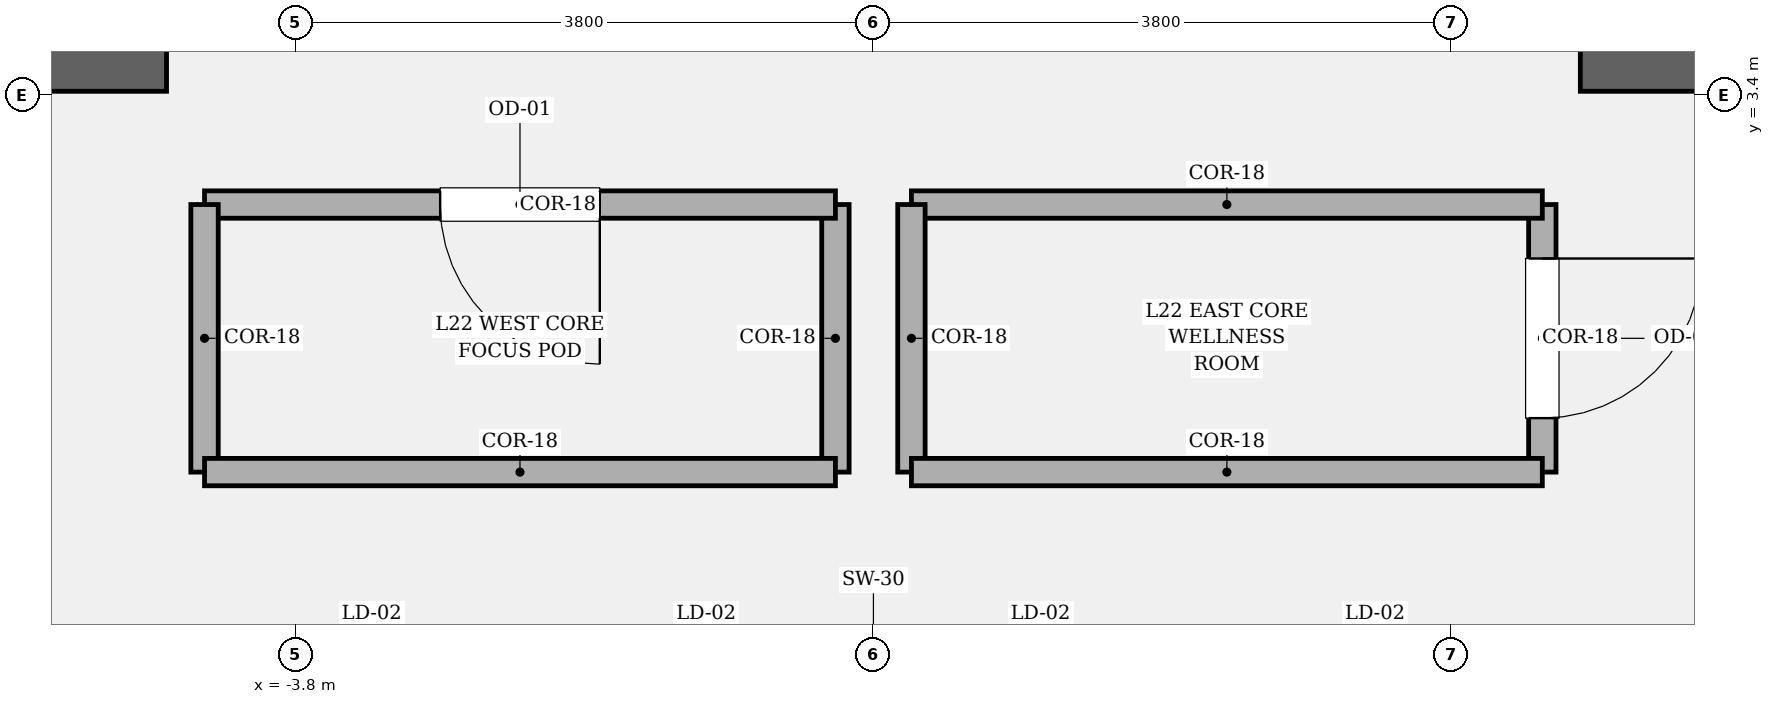
"""IFC4 building model, lengths in metres.
Left out: names, types, materials, properties, quantities, classifications, styles, units other than length and angle.
Written with IfcOpenShell. Run it as: python <this file> out.ifc"""

import sys

from ifc_helpers import new_model, si_unit, direction, frame, frame_2d, origin, place, context, subcontext, project, spatial, rectangle, extrude, element, fill, save


model = new_model("IFC4")
c1 = context("Model", 3, precision=1e-05, world=origin(), true_north=direction((0.0, 1.0)))
c2 = subcontext(c1, "Body", "Model", "MODEL_VIEW")
j1 = project(units=[si_unit("LENGTHUNIT", "METRE"), si_unit("PLANEANGLEUNIT", "RADIAN")], contexts=[c1])
p1 = place(None, origin())
s1 = spatial("IfcSite", under=j1, at=p1, CompositionType="ELEMENT")
p2 = place(p1, origin())
s2 = spatial("IfcBuilding", under=s1, at=p2, CompositionType="ELEMENT")
p3 = place(p2, frame((0.0, 0.0, 97.05)))
s3 = spatial("IfcBuildingStorey", under=s2, at=p3, CompositionType="ELEMENT", Elevation=97.05)
for number, where, z_axis, x_axis in (
    (1, (-9.825, 3.6, 0.0), (0.0, 0.0, 1.0), (1.0, 0.0, 0.0)),
    (2, (4.65, 3.6, 0.0), (0.0, 0.0, 1.0), (1.0, 0.0, 0.0)),
):
    element("IfcWall", number, at=place(p3, frame(where, z_axis=z_axis, x_axis=x_axis)), inside=s3, PredefinedType="SOLIDWALL", context=c2, shape_type="SweptSolid", body=[
        extrude(rectangle(XDim=5.175, YDim=0.35, at=frame_2d((2.587, 0.0))), origin(), (0.0, 0.0, 1.0), 4.05),
    ])
p4 = place(p3, frame((-0.25, 0.92, 0.0), z_axis=(0.0, 0.0, 1.0), x_axis=(0.0, 1.0, 0.0)))
e3 = element("IfcWall", 3, at=p4, inside=s3, PredefinedType="PARTITIONING", context=c2, shape_type="SweptSolid", body=[
    extrude(rectangle(XDim=1.76, YDim=0.18, at=frame_2d((0.88, 0.0))), origin(), (0.0, 0.0, 1.0), 3.81),
])
p5 = place(p3, frame((-0.25, 2.68, 0.0), z_axis=(0.0, 0.0, 1.0), x_axis=(-1.0, 0.0, 0.0)))
e4 = element("IfcWall", 4, at=p5, inside=s3, PredefinedType="PARTITIONING", context=c2, shape_type="SweptSolid", body=[
    extrude(rectangle(XDim=4.15, YDim=0.18, at=frame_2d((2.075, 0.0))), origin(), (0.0, 0.0, 1.0), 3.81),
])
p6 = place(p5, frame((1.55, 0.0, 0.0)))
e5 = element("IfcOpeningElement", 5, at=p6, cuts=e4, PredefinedType="OPENING", context=c2, shape_type="SweptSolid", body=[
    extrude(rectangle(XDim=1.05, YDim=2.2, at=frame_2d((0.525, 1.1))), frame((0.0, 0.1, 0.0), z_axis=(0.0, -1.0, 0.0), x_axis=(1.0, 0.0, 0.0)), (0.0, 0.0, 1.0), 0.2),
])
p7 = place(p3, frame((-4.4, 2.68, 0.0), z_axis=(0.0, 0.0, 1.0), x_axis=(0.0, -1.0, 0.0)))
e6 = element("IfcWall", 6, at=p7, inside=s3, PredefinedType="PARTITIONING", context=c2, shape_type="SweptSolid", body=[
    extrude(rectangle(XDim=1.76, YDim=0.18, at=frame_2d((0.88, 0.0))), origin(), (0.0, 0.0, 1.0), 3.81),
])
p8 = place(p3, frame((-4.4, 0.92, 0.0), z_axis=(0.0, 0.0, 1.0), x_axis=(1.0, 0.0, 0.0)))
e7 = element("IfcWall", 7, at=p8, inside=s3, PredefinedType="PARTITIONING", context=c2, shape_type="SweptSolid", body=[
    extrude(rectangle(XDim=4.15, YDim=0.18, at=frame_2d((2.075, 0.0))), origin(), (0.0, 0.0, 1.0), 3.81),
])
p9 = place(p3, frame((4.4, 0.92, 0.0), z_axis=(0.0, 0.0, 1.0), x_axis=(0.0, 1.0, 0.0)))
e8 = element("IfcWall", 8, at=p9, inside=s3, PredefinedType="PARTITIONING", context=c2, shape_type="SweptSolid", body=[
    extrude(rectangle(XDim=1.76, YDim=0.18, at=frame_2d((0.88, 0.0))), origin(), (0.0, 0.0, 1.0), 3.81),
])
p10 = place(p9, frame((0.355, 0.0, 0.0)))
e9 = element("IfcOpeningElement", 9, at=p10, cuts=e8, PredefinedType="OPENING", context=c2, shape_type="SweptSolid", body=[
    extrude(rectangle(XDim=1.05, YDim=2.2, at=frame_2d((0.525, 1.1))), frame((0.0, 0.1, 0.0), z_axis=(0.0, -1.0, 0.0), x_axis=(1.0, 0.0, 0.0)), (0.0, 0.0, 1.0), 0.2),
])
p11 = place(p3, frame((4.4, 2.68, 0.0), z_axis=(0.0, 0.0, 1.0), x_axis=(-1.0, 0.0, 0.0)))
e10 = element("IfcWall", 10, at=p11, inside=s3, PredefinedType="PARTITIONING", context=c2, shape_type="SweptSolid", body=[
    extrude(rectangle(XDim=4.15, YDim=0.18, at=frame_2d((2.075, 0.0))), origin(), (0.0, 0.0, 1.0), 3.81),
])
p12 = place(p3, frame((0.25, 2.68, 0.0), z_axis=(0.0, 0.0, 1.0), x_axis=(0.0, -1.0, 0.0)))
e11 = element("IfcWall", 11, at=p12, inside=s3, PredefinedType="PARTITIONING", context=c2, shape_type="SweptSolid", body=[
    extrude(rectangle(XDim=1.76, YDim=0.18, at=frame_2d((0.88, 0.0))), origin(), (0.0, 0.0, 1.0), 3.81),
])
p13 = place(p3, frame((0.25, 0.92, 0.0), z_axis=(0.0, 0.0, 1.0), x_axis=(1.0, 0.0, 0.0)))
e12 = element("IfcWall", 12, at=p13, inside=s3, PredefinedType="PARTITIONING", context=c2, shape_type="SweptSolid", body=[
    extrude(rectangle(XDim=4.15, YDim=0.18, at=frame_2d((2.075, 0.0))), origin(), (0.0, 0.0, 1.0), 3.81),
])
p14 = place(p6, origin())
e13 = element("IfcDoor", 13, at=p14, inside=s3, OperationType="SINGLE_SWING_LEFT", PredefinedType="DOOR", context=c2, shape_type="SweptSolid", body=[
    extrude(rectangle(XDim=1.05, YDim=2.2, at=frame_2d((0.525, 1.1))), frame((0.0, 0.025, 0.0), z_axis=(0.0, -1.0, 0.0), x_axis=(1.0, 0.0, 0.0)), (0.0, 0.0, 1.0), 0.05),
])
fill(e5, e13)
p15 = place(p10, origin())
e14 = element("IfcDoor", 14, at=p15, inside=s3, OperationType="SINGLE_SWING_RIGHT", PredefinedType="DOOR", context=c2, shape_type="SweptSolid", body=[
    extrude(rectangle(XDim=1.05, YDim=2.2, at=frame_2d((0.525, 1.1))), frame((0.0, 0.025, 0.0), z_axis=(0.0, -1.0, 0.0), x_axis=(1.0, 0.0, 0.0)), (0.0, 0.0, 1.0), 0.05),
])
fill(e9, e14)
save(model, sys.argv[1])
